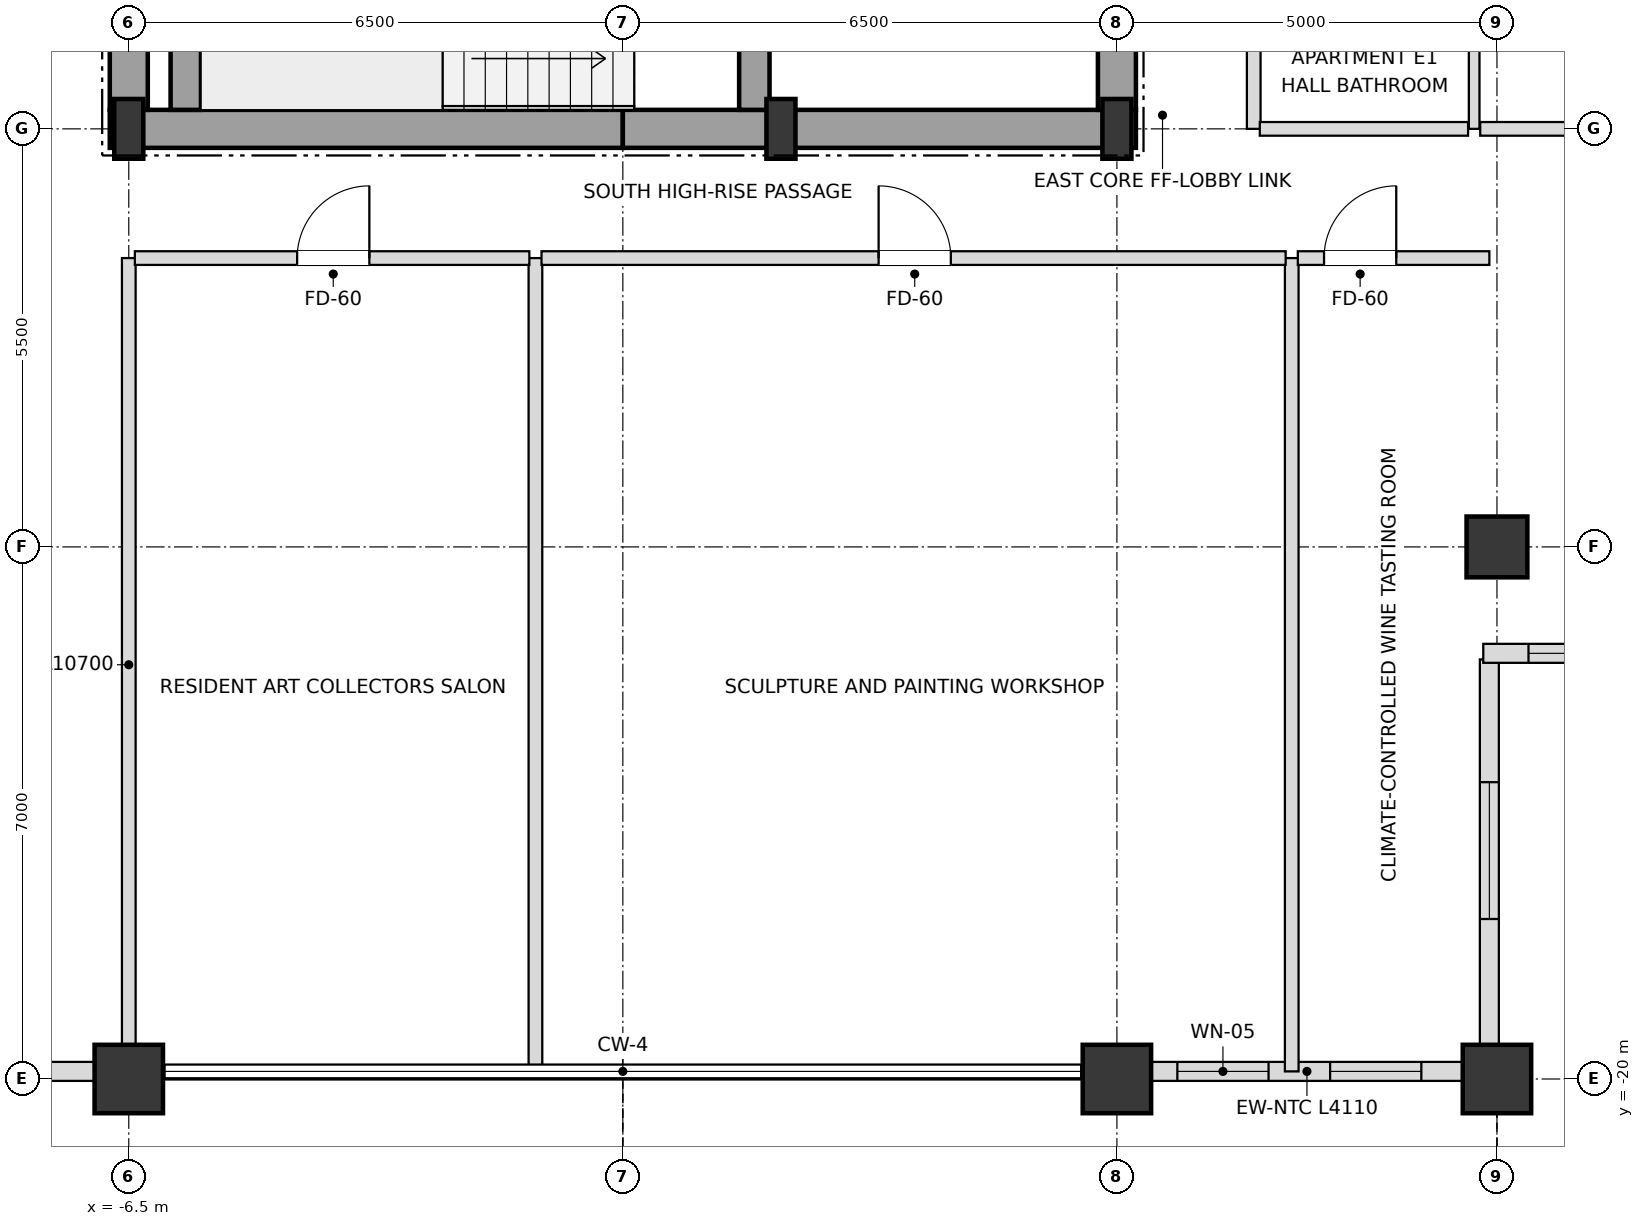
"""IFC4 building model, lengths in metres.
Left out: names, types, materials, properties, quantities, classifications, styles, units other than length and angle.
Written with IfcOpenShell. Run it as: python <this file> out.ifc"""

import sys

from ifc_helpers import new_model, si_unit, direction, frame, frame_2d, origin, origin_2d, place, context, subcontext, project, spatial, rectangle, i_section, extrude, element, fill, save


model = new_model("IFC4")
c1 = context("Model", 3, precision=1e-05, world=origin(), true_north=direction((0.0, 1.0)))
c2 = subcontext(c1, "Body", "Model", "MODEL_VIEW")
j1 = project(units=[si_unit("LENGTHUNIT", "METRE"), si_unit("PLANEANGLEUNIT", "RADIAN")], contexts=[c1])
p1 = place(None, origin())
s1 = spatial("IfcSite", under=j1, at=p1, CompositionType="ELEMENT")
p2 = place(p1, origin())
s2 = spatial("IfcBuilding", under=s1, at=p2, CompositionType="ELEMENT")
p3 = place(p2, frame((0.0, 0.0, 294.3)))
s3 = spatial("IfcBuildingStorey", under=s2, at=p3, CompositionType="ELEMENT", Elevation=294.3)
for number, where, z_axis, x_axis in (
    (1, (-6.5, -7.5, 0.0), (0.0, 0.0, 1.0), (1.0, 0.0, 0.0)),
    (2, (2.08, -7.5, 0.0), (0.0, 0.0, 1.0), (1.0, 0.0, 0.0)),
    (3, (6.5, -7.5, 0.0), (0.0, 0.0, 1.0), (1.0, 0.0, 0.0)),
):
    element("IfcColumn", number, at=place(p3, frame(where, z_axis=z_axis, x_axis=x_axis)), inside=s3, PredefinedType="COLUMN", context=c2, shape_type="SweptSolid", body=[
        extrude(i_section(OverallWidth=0.382, OverallDepth=0.786, WebThickness=0.02, FlangeThickness=0.033, at=origin_2d()), origin(), (0.0, 0.0, 1.0), 3.6),
    ])
for number, where, z_axis, x_axis in (
    (4, (-6.5, -20.0, 0.0), (0.0, 0.0, 1.0), (1.0, 0.0, 0.0)),
    (5, (6.5, -20.0, 0.0), (0.0, 0.0, 1.0), (1.0, 0.0, 0.0)),
    (6, (11.5, -20.0, 0.0), (0.0, 0.0, 1.0), (1.0, 0.0, 0.0)),
):
    element("IfcColumn", number, at=place(p3, frame(where, z_axis=z_axis, x_axis=x_axis)), inside=s3, PredefinedType="USERDEFINED", context=c2, shape_type="SweptSolid", body=[
        extrude(rectangle(XDim=0.9, YDim=0.9, at=origin_2d()), origin(), (0.0, 0.0, 1.0), 3.6),
    ])
p4 = place(p3, frame((11.5, -13.0, 0.0), z_axis=(0.0, 0.0, 1.0), x_axis=(1.0, 0.0, 0.0)))
e7 = element("IfcColumn", 7, at=p4, inside=s3, PredefinedType="COLUMN", context=c2, shape_type="SweptSolid", body=[
    extrude(rectangle(XDim=0.8, YDim=0.8, at=origin_2d()), origin(), (0.0, 0.0, 1.0), 3.6),
])
p5 = place(p3, frame((-11.055, -19.9, 0.0), z_axis=(0.0, 0.0, 1.0), x_axis=(1.0, 0.0, 0.0)))
e8 = element("IfcWall", 8, at=p5, inside=s3, PredefinedType="SOLIDWALL", context=c2, shape_type="SweptSolid", body=[
    extrude(rectangle(XDim=4.11, YDim=0.25, at=frame_2d((2.055, 0.0))), origin(), (0.0, 0.0, 1.0), 2.748),
])
p6 = place(p5, frame((1.155, 0.0, 0.72)))
e9 = element("IfcOpeningElement", 9, at=p6, cuts=e8, PredefinedType="OPENING", context=c2, shape_type="SweptSolid", body=[
    extrude(rectangle(XDim=1.8, YDim=1.68, at=frame_2d((0.9, 0.84))), frame((0.0, 0.135, 0.0), z_axis=(0.0, -1.0, 0.0), x_axis=(1.0, 0.0, 0.0)), (0.0, 0.0, 1.0), 0.27),
])
p7 = place(p3, frame((6.945, -19.9, 0.0), z_axis=(0.0, 0.0, 1.0), x_axis=(1.0, 0.0, 0.0)))
e10 = element("IfcWall", 10, at=p7, inside=s3, PredefinedType="SOLIDWALL", context=c2, shape_type="SweptSolid", body=[
    extrude(rectangle(XDim=4.11, YDim=0.25, at=frame_2d((2.055, 0.0))), origin(), (0.0, 0.0, 1.0), 2.748),
])
p8 = place(p7, frame((0.35, 0.0, 0.72)))
e11 = element("IfcOpeningElement", 11, at=p8, cuts=e10, PredefinedType="OPENING", context=c2, shape_type="SweptSolid", body=[
    extrude(rectangle(XDim=1.2, YDim=1.68, at=frame_2d((0.6, 0.84))), frame((0.0, 0.135, 0.0), z_axis=(0.0, -1.0, 0.0), x_axis=(1.0, 0.0, 0.0)), (0.0, 0.0, 1.0), 0.27),
])
p9 = place(p7, frame((2.36, 0.0, 0.72)))
e12 = element("IfcOpeningElement", 12, at=p9, cuts=e10, PredefinedType="OPENING", context=c2, shape_type="SweptSolid", body=[
    extrude(rectangle(XDim=1.2, YDim=1.68, at=frame_2d((0.6, 0.84))), frame((0.0, 0.135, 0.0), z_axis=(0.0, -1.0, 0.0), x_axis=(1.0, 0.0, 0.0)), (0.0, 0.0, 1.0), 0.27),
])
p10 = place(p3, frame((11.4, -19.82, 0.0), z_axis=(0.0, 0.0, 1.0), x_axis=(0.0, 1.0, 0.0)))
e13 = element("IfcWall", 13, at=p10, inside=s3, PredefinedType="SOLIDWALL", context=c2, shape_type="SweptSolid", body=[
    extrude(rectangle(XDim=5.34, YDim=0.25, at=frame_2d((2.67, 0.0))), origin(), (0.0, 0.0, 1.0), 2.748),
])
p11 = place(p10, frame((1.925, 0.0, 0.72)))
e14 = element("IfcOpeningElement", 14, at=p11, cuts=e13, PredefinedType="OPENING", context=c2, shape_type="SweptSolid", body=[
    extrude(rectangle(XDim=1.8, YDim=1.68, at=frame_2d((0.9, 0.84))), frame((0.0, 0.135, 0.0), z_axis=(0.0, -1.0, 0.0), x_axis=(1.0, 0.0, 0.0)), (0.0, 0.0, 1.0), 0.27),
])
p12 = place(p3, frame((11.32, -14.4, 0.0), z_axis=(0.0, 0.0, 1.0), x_axis=(1.0, 0.0, 0.0)))
e15 = element("IfcWall", 15, at=p12, inside=s3, PredefinedType="SOLIDWALL", context=c2, shape_type="SweptSolid", body=[
    extrude(rectangle(XDim=5.66, YDim=0.25, at=frame_2d((2.83, 0.0))), origin(), (0.0, 0.0, 1.0), 2.748),
])
p13 = place(p12, frame((0.595, 0.0, 0.72)))
e16 = element("IfcOpeningElement", 16, at=p13, cuts=e15, PredefinedType="OPENING", context=c2, shape_type="SweptSolid", body=[
    extrude(rectangle(XDim=1.8, YDim=1.68, at=frame_2d((0.9, 0.84))), frame((0.0, 0.135, 0.0), z_axis=(0.0, -1.0, 0.0), x_axis=(1.0, 0.0, 0.0)), (0.0, 0.0, 1.0), 0.27),
])
p14 = place(p12, frame((3.265, 0.0, 0.72)))
e17 = element("IfcOpeningElement", 17, at=p14, cuts=e15, PredefinedType="OPENING", context=c2, shape_type="SweptSolid", body=[
    extrude(rectangle(XDim=1.8, YDim=1.68, at=frame_2d((0.9, 0.84))), frame((0.0, 0.135, 0.0), z_axis=(0.0, -1.0, 0.0), x_axis=(1.0, 0.0, 0.0)), (0.0, 0.0, 1.0), 0.27),
])
for number, where, z_axis, x_axis in (
    (18, (-6.75, -7.5, 0.0), (0.0, 0.0, 1.0), (1.0, 0.0, 0.0)),
    (19, (0.0, -7.5, 0.0), (0.0, 0.0, 1.0), (1.0, 0.0, 0.0)),
):
    element("IfcWall", number, at=place(p3, frame(where, z_axis=z_axis, x_axis=x_axis)), inside=s3, PredefinedType="SHEAR", context=c2, shape_type="SweptSolid", body=[
        extrude(rectangle(XDim=6.75, YDim=0.5, at=frame_2d((3.375, 0.0))), origin(), (0.0, 0.0, 1.0), 3.38),
    ])
p15 = place(p3, frame((-6.5, -7.25, 0.0), z_axis=(0.0, 0.0, 1.0), x_axis=(0.0, 1.0, 0.0)))
e20 = element("IfcWall", 20, at=p15, inside=s3, PredefinedType="SHEAR", context=c2, shape_type="SweptSolid", body=[
    extrude(rectangle(XDim=3.55, YDim=0.5, at=frame_2d((1.775, 0.0))), origin(), (0.0, 0.0, 1.0), 3.38),
])
p16 = place(p3, frame((6.5, -7.25, 0.0), z_axis=(0.0, 0.0, 1.0), x_axis=(0.0, 1.0, 0.0)))
e21 = element("IfcWall", 21, at=p16, inside=s3, PredefinedType="SHEAR", context=c2, shape_type="SweptSolid", body=[
    extrude(rectangle(XDim=5.75, YDim=0.5, at=frame_2d((2.875, 0.0))), origin(), (0.0, 0.0, 1.0), 3.38),
])
p17 = place(p16, frame((0.85, 0.0, 0.0)))
e22 = element("IfcOpeningElement", 22, at=p17, cuts=e21, PredefinedType="OPENING", context=c2, shape_type="SweptSolid", body=[
    extrude(rectangle(XDim=1.05, YDim=2.15, at=frame_2d((0.525, 1.075))), frame((0.0, 0.26, 0.0), z_axis=(0.0, -1.0, 0.0), x_axis=(1.0, 0.0, 0.0)), (0.0, 0.0, 1.0), 0.52),
])
p18 = place(p3, frame((-5.75, -7.25, 0.0), z_axis=(0.0, 0.0, 1.0), x_axis=(0.0, 1.0, 0.0)))
e23 = element("IfcWall", 23, at=p18, inside=s3, PredefinedType="SHEAR", context=c2, shape_type="SweptSolid", body=[
    extrude(rectangle(XDim=2.9, YDim=0.4, at=frame_2d((1.45, 0.0))), origin(), (0.0, 0.0, 1.0), 3.38),
])
p19 = place(p3, frame((1.73, -7.25, 0.0), z_axis=(0.0, 0.0, 1.0), x_axis=(0.0, 1.0, 0.0)))
e24 = element("IfcWall", 24, at=p19, inside=s3, PredefinedType="SHEAR", context=c2, shape_type="SweptSolid", body=[
    extrude(rectangle(XDim=3.3, YDim=0.4, at=frame_2d((1.65, 0.0))), origin(), (0.0, 0.0, 1.0), 3.38),
])
p20 = place(p19, frame((0.9, 0.0, 0.0)))
e25 = element("IfcOpeningElement", 25, at=p20, cuts=e24, PredefinedType="OPENING", context=c2, shape_type="SweptSolid", body=[
    extrude(rectangle(XDim=1.05, YDim=2.15, at=frame_2d((0.525, 1.075))), frame((0.0, 0.21, 0.0), z_axis=(0.0, -1.0, 0.0), x_axis=(1.0, 0.0, 0.0)), (0.0, 0.0, 1.0), 0.42),
])
p21 = place(p3, frame((-6.5, -19.9, 0.0), z_axis=(0.0, 0.0, 1.0), x_axis=(0.0, 1.0, 0.0)))
e26 = element("IfcWall", 26, at=p21, inside=s3, PredefinedType="PARTITIONING", context=c2, shape_type="SweptSolid", body=[
    extrude(rectangle(XDim=10.7, YDim=0.18, at=frame_2d((5.35, 0.0))), origin(), (0.0, 0.0, 1.0), 2.826),
])
p22 = place(p3, frame((-1.15, -19.9, 0.0), z_axis=(0.0, 0.0, 1.0), x_axis=(0.0, 1.0, 0.0)))
e27 = element("IfcWall", 27, at=p22, inside=s3, PredefinedType="PARTITIONING", context=c2, shape_type="SweptSolid", body=[
    extrude(rectangle(XDim=10.7, YDim=0.18, at=frame_2d((5.35, 0.0))), origin(), (0.0, 0.0, 1.0), 3.018),
])
p23 = place(p3, frame((8.3, -7.5, 0.0), z_axis=(0.0, 0.0, 1.0), x_axis=(0.0, 1.0, 0.0)))
e28 = element("IfcWall", 28, at=p23, inside=s3, PredefinedType="PARTITIONING", context=c2, shape_type="SweptSolid", body=[
    extrude(rectangle(XDim=15.0, YDim=0.18, at=frame_2d((7.5, 0.0))), origin(), (0.0, 0.0, 1.0), 3.38),
])
p24 = place(p23, frame((2.355, 0.0, 0.0)))
e29 = element("IfcOpeningElement", 29, at=p24, cuts=e28, PredefinedType="OPENING", context=c2, shape_type="SweptSolid", body=[
    extrude(rectangle(XDim=0.95, YDim=2.15, at=frame_2d((0.475, 1.075))), frame((0.0, 0.1, 0.0), z_axis=(0.0, -1.0, 0.0), x_axis=(1.0, 0.0, 0.0)), (0.0, 0.0, 1.0), 0.2),
])
p25 = place(p3, frame((8.8, -19.9, 0.0), z_axis=(0.0, 0.0, 1.0), x_axis=(0.0, 1.0, 0.0)))
e30 = element("IfcWall", 30, at=p25, inside=s3, PredefinedType="PARTITIONING", context=c2, shape_type="SweptSolid", body=[
    extrude(rectangle(XDim=10.7, YDim=0.18, at=frame_2d((5.35, 0.0))), origin(), (0.0, 0.0, 1.0), 2.826),
])
p26 = place(p3, frame((11.2, -7.5, 0.0), z_axis=(0.0, 0.0, 1.0), x_axis=(0.0, 1.0, 0.0)))
e31 = element("IfcWall", 31, at=p26, inside=s3, PredefinedType="PARTITIONING", context=c2, shape_type="SweptSolid", body=[
    extrude(rectangle(XDim=15.0, YDim=0.14, at=frame_2d((7.5, 0.0))), origin(), (0.0, 0.0, 1.0), 3.38),
])
p27 = place(p26, frame((3.475, 0.0, 0.0)))
e32 = element("IfcOpeningElement", 32, at=p27, cuts=e31, PredefinedType="OPENING", context=c2, shape_type="SweptSolid", body=[
    extrude(rectangle(XDim=0.95, YDim=2.1, at=frame_2d((0.475, 1.05))), frame((0.0, 0.08, 0.0), z_axis=(0.0, -1.0, 0.0), x_axis=(1.0, 0.0, 0.0)), (0.0, 0.0, 1.0), 0.16),
])
p28 = place(p3, frame((-6.42, -9.2, 0.0), z_axis=(0.0, 0.0, 1.0), x_axis=(1.0, 0.0, 0.0)))
e33 = element("IfcWall", 33, at=p28, inside=s3, PredefinedType="PARTITIONING", context=c2, shape_type="SweptSolid", body=[
    extrude(rectangle(XDim=5.19, YDim=0.18, at=frame_2d((2.595, 0.0))), origin(), (0.0, 0.0, 1.0), 3.38),
])
p29 = place(p28, frame((2.135, 0.0, 0.0)))
e34 = element("IfcOpeningElement", 34, at=p29, cuts=e33, PredefinedType="OPENING", context=c2, shape_type="SweptSolid", body=[
    extrude(rectangle(XDim=0.95, YDim=2.15, at=frame_2d((0.475, 1.075))), frame((0.0, 0.1, 0.0), z_axis=(0.0, -1.0, 0.0), x_axis=(1.0, 0.0, 0.0)), (0.0, 0.0, 1.0), 0.2),
])
p30 = place(p3, frame((-1.07, -9.2, 0.0), z_axis=(0.0, 0.0, 1.0), x_axis=(1.0, 0.0, 0.0)))
e35 = element("IfcWall", 35, at=p30, inside=s3, PredefinedType="PARTITIONING", context=c2, shape_type="SweptSolid", body=[
    extrude(rectangle(XDim=9.79, YDim=0.18, at=frame_2d((4.895, 0.0))), origin(), (0.0, 0.0, 1.0), 2.826),
])
p31 = place(p30, frame((4.435, 0.0, 0.0)))
e36 = element("IfcOpeningElement", 36, at=p31, cuts=e35, PredefinedType="OPENING", context=c2, shape_type="SweptSolid", body=[
    extrude(rectangle(XDim=0.95, YDim=2.15, at=frame_2d((0.475, 1.075))), frame((0.0, 0.1, 0.0), z_axis=(0.0, -1.0, 0.0), x_axis=(1.0, 0.0, 0.0)), (0.0, 0.0, 1.0), 0.2),
])
p32 = place(p3, frame((8.88, -9.2, 0.0), z_axis=(0.0, 0.0, 1.0), x_axis=(1.0, 0.0, 0.0)))
e37 = element("IfcWall", 37, at=p32, inside=s3, PredefinedType="PARTITIONING", context=c2, shape_type="SweptSolid", body=[
    extrude(rectangle(XDim=2.52, YDim=0.18, at=frame_2d((1.26, 0.0))), origin(), (0.0, 0.0, 1.0), 3.38),
])
p33 = place(p32, frame((0.345, 0.0, 0.0)))
e38 = element("IfcOpeningElement", 38, at=p33, cuts=e37, PredefinedType="OPENING", context=c2, shape_type="SweptSolid", body=[
    extrude(rectangle(XDim=0.95, YDim=2.15, at=frame_2d((0.475, 1.075))), frame((0.0, 0.1, 0.0), z_axis=(0.0, -1.0, 0.0), x_axis=(1.0, 0.0, 0.0)), (0.0, 0.0, 1.0), 0.2),
])
p34 = place(p3, frame((8.38, -7.5, 0.0), z_axis=(0.0, 0.0, 1.0), x_axis=(1.0, 0.0, 0.0)))
e39 = element("IfcWall", 39, at=p34, inside=s3, PredefinedType="PARTITIONING", context=c2, shape_type="SweptSolid", body=[
    extrude(rectangle(XDim=2.74, YDim=0.18, at=frame_2d((1.37, 0.0))), origin(), (0.0, 0.0, 1.0), 2.826),
])
p35 = place(p3, frame((11.28, -7.5, 0.0), z_axis=(0.0, 0.0, 1.0), x_axis=(1.0, 0.0, 0.0)))
e40 = element("IfcWall", 40, at=p35, inside=s3, PredefinedType="PARTITIONING", context=c2, shape_type="SweptSolid", body=[
    extrude(rectangle(XDim=5.62, YDim=0.18, at=frame_2d((2.81, 0.0))), origin(), (0.0, 0.0, 1.0), 2.826),
])
p36 = place(p8, origin())
e41 = element("IfcWindow", 41, at=p36, inside=s3, PartitioningType="SINGLE_PANEL", PredefinedType="WINDOW", context=c2, shape_type="SweptSolid", body=[
    extrude(rectangle(XDim=1.2, YDim=1.68, at=frame_2d((0.6, 0.84))), frame((0.0, 0.03, 0.0), z_axis=(0.0, -1.0, 0.0), x_axis=(1.0, 0.0, 0.0)), (0.0, 0.0, 1.0), 0.06),
])
fill(e11, e41)
p37 = place(p9, origin())
e42 = element("IfcWindow", 42, at=p37, inside=s3, PartitioningType="SINGLE_PANEL", PredefinedType="WINDOW", context=c2, shape_type="SweptSolid", body=[
    extrude(rectangle(XDim=1.2, YDim=1.68, at=frame_2d((0.6, 0.84))), frame((0.0, 0.03, 0.0), z_axis=(0.0, -1.0, 0.0), x_axis=(1.0, 0.0, 0.0)), (0.0, 0.0, 1.0), 0.06),
])
fill(e12, e42)
p38 = place(p11, origin())
e43 = element("IfcWindow", 43, at=p38, inside=s3, PartitioningType="SINGLE_PANEL", PredefinedType="WINDOW", context=c2, shape_type="SweptSolid", body=[
    extrude(rectangle(XDim=1.8, YDim=1.68, at=frame_2d((0.9, 0.84))), frame((0.0, 0.03, 0.0), z_axis=(0.0, -1.0, 0.0), x_axis=(1.0, 0.0, 0.0)), (0.0, 0.0, 1.0), 0.06),
])
fill(e14, e43)
p39 = place(p13, origin())
e44 = element("IfcWindow", 44, at=p39, inside=s3, PartitioningType="SINGLE_PANEL", PredefinedType="WINDOW", context=c2, shape_type="SweptSolid", body=[
    extrude(rectangle(XDim=1.8, YDim=1.68, at=frame_2d((0.9, 0.84))), frame((0.0, 0.03, 0.0), z_axis=(0.0, -1.0, 0.0), x_axis=(1.0, 0.0, 0.0)), (0.0, 0.0, 1.0), 0.06),
])
fill(e16, e44)
p40 = place(p29, origin())
e45 = element("IfcDoor", 45, at=p40, inside=s3, OperationType="SINGLE_SWING_RIGHT", PredefinedType="DOOR", context=c2, shape_type="SweptSolid", body=[
    extrude(rectangle(XDim=0.95, YDim=2.15, at=frame_2d((0.475, 1.075))), frame((0.0, 0.025, 0.0), z_axis=(0.0, -1.0, 0.0), x_axis=(1.0, 0.0, 0.0)), (0.0, 0.0, 1.0), 0.05),
])
fill(e34, e45)
p41 = place(p31, origin())
e46 = element("IfcDoor", 46, at=p41, inside=s3, OperationType="SINGLE_SWING_LEFT", PredefinedType="DOOR", context=c2, shape_type="SweptSolid", body=[
    extrude(rectangle(XDim=0.95, YDim=2.15, at=frame_2d((0.475, 1.075))), frame((0.0, 0.025, 0.0), z_axis=(0.0, -1.0, 0.0), x_axis=(1.0, 0.0, 0.0)), (0.0, 0.0, 1.0), 0.05),
])
fill(e36, e46)
p42 = place(p33, origin())
e47 = element("IfcDoor", 47, at=p42, inside=s3, OperationType="SINGLE_SWING_RIGHT", PredefinedType="DOOR", context=c2, shape_type="SweptSolid", body=[
    extrude(rectangle(XDim=0.95, YDim=2.15, at=frame_2d((0.475, 1.075))), frame((0.0, 0.025, 0.0), z_axis=(0.0, -1.0, 0.0), x_axis=(1.0, 0.0, 0.0)), (0.0, 0.0, 1.0), 0.05),
])
fill(e38, e47)
save(model, sys.argv[1])
